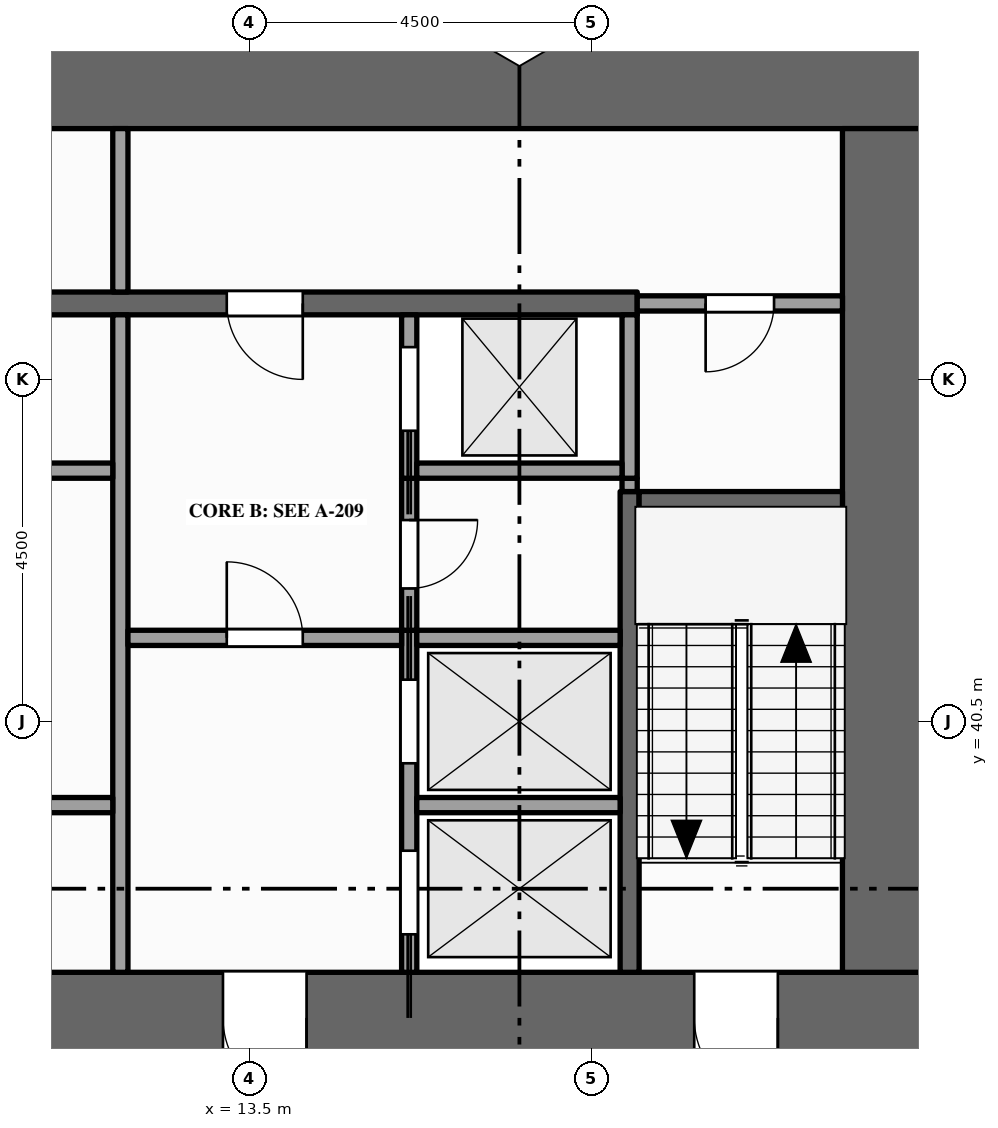
"""IFC4 building model, lengths in metres.
Left out: names, types, materials, properties, quantities, classifications, styles, units other than length and angle.
Written with IfcOpenShell. Run it as: python <this file> out.ifc"""

import sys

from ifc_helpers import new_model, si_unit, direction, frame, frame_2d, origin, place, context, subcontext, project, spatial, rectangle, extrude, element, fill, save


model = new_model("IFC4")
c1 = context("Model", 3, precision=1e-05, world=origin(), true_north=direction((0.0, 1.0)))
c2 = subcontext(c1, "Body", "Model", "MODEL_VIEW")
j1 = project(units=[si_unit("LENGTHUNIT", "METRE"), si_unit("PLANEANGLEUNIT", "RADIAN")], contexts=[c1])
p1 = place(None, origin())
s1 = spatial("IfcSite", under=j1, at=p1, CompositionType="ELEMENT")
p2 = place(p1, origin())
s2 = spatial("IfcBuilding", under=s1, at=p2, CompositionType="ELEMENT")
p3 = place(p2, frame((0.0, 0.0, 45.0)))
s3 = spatial("IfcBuildingStorey", under=s2, at=p3, CompositionType="ELEMENT", Elevation=45.0)
p4 = place(p3, frame((0.0, 36.6, -0.15), z_axis=(0.0, 0.0, 1.0), x_axis=(1.0, 0.0, 0.0)))
e1 = element("IfcWall", 1, at=p4, inside=s3, PredefinedType="SHEAR", context=c2, shape_type="SweptSolid", body=[
    extrude(rectangle(XDim=22.5, YDim=1.2, at=frame_2d((11.25, 0.0))), origin(), (0.0, 0.0, 1.0), 4.0),
])
p5 = place(p4, frame((7.1, 0.0, 0.15)))
e2 = element("IfcOpeningElement", 2, at=p5, cuts=e1, PredefinedType="OPENING", context=c2, shape_type="SweptSolid", body=[
    extrude(rectangle(XDim=1.8, YDim=2.1, at=frame_2d((0.9, 1.05))), frame((0.0, 0.61, 0.0), z_axis=(0.0, -1.0, 0.0), x_axis=(1.0, 0.0, 0.0)), (0.0, 0.0, 1.0), 1.22),
])
p6 = place(p4, frame((13.15, 0.0, 0.15)))
e3 = element("IfcOpeningElement", 3, at=p6, cuts=e1, PredefinedType="OPENING", context=c2, shape_type="SweptSolid", body=[
    extrude(rectangle(XDim=1.1, YDim=2.1, at=frame_2d((0.55, 1.05))), frame((0.0, 0.61, 0.0), z_axis=(0.0, -1.0, 0.0), x_axis=(1.0, 0.0, 0.0)), (0.0, 0.0, 1.0), 1.22),
])
p7 = place(p4, frame((2.15, 0.0, 0.15)))
e4 = element("IfcOpeningElement", 4, at=p7, cuts=e1, PredefinedType="OPENING", context=c2, shape_type="SweptSolid", body=[
    extrude(rectangle(XDim=1.1, YDim=2.1, at=frame_2d((0.55, 1.05))), frame((0.0, 0.61, 0.0), z_axis=(0.0, -1.0, 0.0), x_axis=(1.0, 0.0, 0.0)), (0.0, 0.0, 1.0), 1.22),
])
p8 = place(p4, frame((19.35, 0.0, 0.15)))
e5 = element("IfcOpeningElement", 5, at=p8, cuts=e1, PredefinedType="OPENING", context=c2, shape_type="SweptSolid", body=[
    extrude(rectangle(XDim=1.1, YDim=2.1, at=frame_2d((0.55, 1.05))), frame((0.0, 0.61, 0.0), z_axis=(0.0, -1.0, 0.0), x_axis=(1.0, 0.0, 0.0)), (0.0, 0.0, 1.0), 1.22),
])
p9 = place(p3, frame((0.0, 48.9, -0.15), z_axis=(0.0, 0.0, 1.0), x_axis=(1.0, 0.0, 0.0)))
e6 = element("IfcWall", 6, at=p9, inside=s3, PredefinedType="SHEAR", context=c2, shape_type="SweptSolid", body=[
    extrude(rectangle(XDim=22.5, YDim=1.2, at=frame_2d((11.25, 0.0))), origin(), (0.0, 0.0, 1.0), 4.0),
])
p10 = place(p3, frame((21.9, 37.2, -0.15), z_axis=(0.0, 0.0, 1.0), x_axis=(0.0, 1.0, 0.0)))
e7 = element("IfcWall", 7, at=p10, inside=s3, PredefinedType="SHEAR", context=c2, shape_type="SweptSolid", body=[
    extrude(rectangle(XDim=11.1, YDim=1.2, at=frame_2d((5.55, 0.0))), origin(), (0.0, 0.0, 1.0), 4.0),
])
p11 = place(p3, frame((11.8, 37.2, 0.0), z_axis=(0.0, 0.0, 1.0), x_axis=(0.0, 1.0, 0.0)))
e8 = element("IfcWall", 8, at=p11, inside=s3, PredefinedType="PARTITIONING", context=c2, shape_type="SweptSolid", body=[
    extrude(rectangle(XDim=8.65, YDim=0.2, at=frame_2d((4.325, 0.0))), origin(), (0.0, 0.0, 1.0), 3.85),
])
p12 = place(p3, frame((11.8, 46.15, 0.0), z_axis=(0.0, 0.0, 1.0), x_axis=(0.0, 1.0, 0.0)))
e9 = element("IfcWall", 9, at=p12, inside=s3, PredefinedType="PARTITIONING", context=c2, shape_type="SweptSolid", body=[
    extrude(rectangle(XDim=2.15, YDim=0.2, at=frame_2d((1.075, 0.0))), origin(), (0.0, 0.0, 1.0), 3.85),
])
p13 = place(p3, frame((15.6, 37.2, 0.0), z_axis=(0.0, 0.0, 1.0), x_axis=(0.0, 1.0, 0.0)))
e10 = element("IfcWall", 10, at=p13, inside=s3, PredefinedType="SOLIDWALL", context=c2, shape_type="SweptSolid", body=[
    extrude(rectangle(XDim=4.5, YDim=0.2, at=frame_2d((2.25, 0.0))), origin(), (0.0, 0.0, 1.0), 3.85),
])
p14 = place(p13, frame((0.5, 0.0, 0.012)))
e11 = element("IfcOpeningElement", 11, at=p14, cuts=e10, PredefinedType="OPENING", context=c2, shape_type="SweptSolid", body=[
    extrude(rectangle(XDim=1.1, YDim=2.1, at=frame_2d((0.55, 1.05))), frame((0.0, 0.11, 0.0), z_axis=(0.0, -1.0, 0.0), x_axis=(1.0, 0.0, 0.0)), (0.0, 0.0, 1.0), 0.22),
])
p15 = place(p13, frame((2.75, 0.0, 0.012)))
e12 = element("IfcOpeningElement", 12, at=p15, cuts=e10, PredefinedType="OPENING", context=c2, shape_type="SweptSolid", body=[
    extrude(rectangle(XDim=1.1, YDim=2.1, at=frame_2d((0.55, 1.05))), frame((0.0, 0.11, 0.0), z_axis=(0.0, -1.0, 0.0), x_axis=(1.0, 0.0, 0.0)), (0.0, 0.0, 1.0), 0.22),
])
p16 = place(p3, frame((15.6, 41.7, 0.0), z_axis=(0.0, 0.0, 1.0), x_axis=(0.0, 1.0, 0.0)))
e13 = element("IfcWall", 13, at=p16, inside=s3, PredefinedType="PARTITIONING", context=c2, shape_type="SweptSolid", body=[
    extrude(rectangle(XDim=2.0, YDim=0.2, at=frame_2d((1.0, 0.0))), origin(), (0.0, 0.0, 1.0), 3.85),
])
p17 = place(p16, frame((0.55, 0.0, 0.0)))
e14 = element("IfcOpeningElement", 14, at=p17, cuts=e13, PredefinedType="OPENING", context=c2, shape_type="SweptSolid", body=[
    extrude(rectangle(XDim=0.9, YDim=2.1, at=frame_2d((0.45, 1.05))), frame((0.0, 0.11, 0.0), z_axis=(0.0, -1.0, 0.0), x_axis=(1.0, 0.0, 0.0)), (0.0, 0.0, 1.0), 0.22),
])
p18 = place(p3, frame((15.6, 43.7, 0.0), z_axis=(0.0, 0.0, 1.0), x_axis=(0.0, 1.0, 0.0)))
e15 = element("IfcWall", 15, at=p18, inside=s3, PredefinedType="SOLIDWALL", context=c2, shape_type="SweptSolid", body=[
    extrude(rectangle(XDim=2.15, YDim=0.2, at=frame_2d((1.075, 0.0))), origin(), (0.0, 0.0, 1.0), 3.85),
])
p19 = place(p18, frame((0.625, 0.0, 0.012)))
e16 = element("IfcOpeningElement", 16, at=p19, cuts=e15, PredefinedType="OPENING", context=c2, shape_type="SweptSolid", body=[
    extrude(rectangle(XDim=1.1, YDim=2.1, at=frame_2d((0.55, 1.05))), frame((0.0, 0.11, 0.0), z_axis=(0.0, -1.0, 0.0), x_axis=(1.0, 0.0, 0.0)), (0.0, 0.0, 1.0), 0.22),
])
p20 = place(p3, frame((18.5, 37.2, 0.0), z_axis=(0.0, 0.0, 1.0), x_axis=(0.0, 1.0, 0.0)))
e17 = element("IfcWall", 17, at=p20, inside=s3, PredefinedType="SHEAR", context=c2, shape_type="SweptSolid", body=[
    extrude(rectangle(XDim=6.325, YDim=0.25, at=frame_2d((3.163, 0.0))), origin(), (0.0, 0.0, 1.0), 3.85),
])
p21 = place(p3, frame((18.5, 43.525, 0.0), z_axis=(0.0, 0.0, 1.0), x_axis=(0.0, 1.0, 0.0)))
e18 = element("IfcWall", 18, at=p21, inside=s3, PredefinedType="PARTITIONING", context=c2, shape_type="SweptSolid", body=[
    extrude(rectangle(XDim=0.175, YDim=0.2, at=frame_2d((0.087, 0.0))), origin(), (0.0, 0.0, 1.0), 3.85),
])
p22 = place(p3, frame((18.5, 43.7, 0.0), z_axis=(0.0, 0.0, 1.0), x_axis=(0.0, 1.0, 0.0)))
e19 = element("IfcWall", 19, at=p22, inside=s3, PredefinedType="SOLIDWALL", context=c2, shape_type="SweptSolid", body=[
    extrude(rectangle(XDim=2.15, YDim=0.2, at=frame_2d((1.075, 0.0))), origin(), (0.0, 0.0, 1.0), 3.85),
])
p23 = place(p3, frame((9.5, 39.4, 0.0), z_axis=(0.0, 0.0, 1.0), x_axis=(1.0, 0.0, 0.0)))
e20 = element("IfcWall", 20, at=p23, inside=s3, PredefinedType="PARTITIONING", context=c2, shape_type="SweptSolid", body=[
    extrude(rectangle(XDim=2.2, YDim=0.2, at=frame_2d((1.1, 0.0))), origin(), (0.0, 0.0, 1.0), 3.85),
])
p24 = place(p3, frame((15.7, 39.4, 0.0), z_axis=(0.0, 0.0, 1.0), x_axis=(1.0, 0.0, 0.0)))
e21 = element("IfcWall", 21, at=p24, inside=s3, PredefinedType="SOLIDWALL", context=c2, shape_type="SweptSolid", body=[
    extrude(rectangle(XDim=2.675, YDim=0.2, at=frame_2d((1.337, 0.0))), origin(), (0.0, 0.0, 1.0), 3.85),
])
p25 = place(p3, frame((11.9, 41.6, 0.0), z_axis=(0.0, 0.0, 1.0), x_axis=(1.0, 0.0, 0.0)))
e22 = element("IfcWall", 22, at=p25, inside=s3, PredefinedType="PARTITIONING", context=c2, shape_type="SweptSolid", body=[
    extrude(rectangle(XDim=3.6, YDim=0.2, at=frame_2d((1.8, 0.0))), origin(), (0.0, 0.0, 1.0), 3.85),
])
p26 = place(p25, frame((1.3, 0.0, 0.0)))
e23 = element("IfcOpeningElement", 23, at=p26, cuts=e22, PredefinedType="OPENING", context=c2, shape_type="SweptSolid", body=[
    extrude(rectangle(XDim=1.0, YDim=2.1, at=frame_2d((0.5, 1.05))), frame((0.0, 0.11, 0.0), z_axis=(0.0, -1.0, 0.0), x_axis=(1.0, 0.0, 0.0)), (0.0, 0.0, 1.0), 0.22),
])
p27 = place(p3, frame((15.7, 41.6, 0.0), z_axis=(0.0, 0.0, 1.0), x_axis=(1.0, 0.0, 0.0)))
e24 = element("IfcWall", 24, at=p27, inside=s3, PredefinedType="SOLIDWALL", context=c2, shape_type="SweptSolid", body=[
    extrude(rectangle(XDim=2.675, YDim=0.2, at=frame_2d((1.337, 0.0))), origin(), (0.0, 0.0, 1.0), 3.85),
])
p28 = place(p3, frame((18.625, 43.4, 0.0), z_axis=(0.0, 0.0, 1.0), x_axis=(1.0, 0.0, 0.0)))
e25 = element("IfcWall", 25, at=p28, inside=s3, PredefinedType="SHEAR", context=c2, shape_type="SweptSolid", body=[
    extrude(rectangle(XDim=2.675, YDim=0.25, at=frame_2d((1.337, 0.0))), origin(), (0.0, 0.0, 1.0), 3.85),
])
p29 = place(p3, frame((9.5, 43.8, 0.0), z_axis=(0.0, 0.0, 1.0), x_axis=(1.0, 0.0, 0.0)))
e26 = element("IfcWall", 26, at=p29, inside=s3, PredefinedType="PARTITIONING", context=c2, shape_type="SweptSolid", body=[
    extrude(rectangle(XDim=2.2, YDim=0.2, at=frame_2d((1.1, 0.0))), origin(), (0.0, 0.0, 1.0), 3.85),
])
p30 = place(p3, frame((15.7, 43.8, 0.0), z_axis=(0.0, 0.0, 1.0), x_axis=(1.0, 0.0, 0.0)))
e27 = element("IfcWall", 27, at=p30, inside=s3, PredefinedType="SOLIDWALL", context=c2, shape_type="SweptSolid", body=[
    extrude(rectangle(XDim=2.7, YDim=0.2, at=frame_2d((1.35, 0.0))), origin(), (0.0, 0.0, 1.0), 3.85),
])
p31 = place(p3, frame((4.1, 46.0, 0.0), z_axis=(0.0, 0.0, 1.0), x_axis=(1.0, 0.0, 0.0)))
e28 = element("IfcWall", 28, at=p31, inside=s3, PredefinedType="SHEAR", context=c2, shape_type="SweptSolid", body=[
    extrude(rectangle(XDim=14.5, YDim=0.3, at=frame_2d((7.25, 0.0))), origin(), (0.0, 0.0, 1.0), 3.85),
])
p32 = place(p31, frame((3.4, 0.0, 0.0)))
e29 = element("IfcOpeningElement", 29, at=p32, cuts=e28, PredefinedType="OPENING", context=c2, shape_type="SweptSolid", body=[
    extrude(rectangle(XDim=1.0, YDim=2.1, at=frame_2d((0.5, 1.05))), frame((0.0, 0.16, 0.0), z_axis=(0.0, -1.0, 0.0), x_axis=(1.0, 0.0, 0.0)), (0.0, 0.0, 1.0), 0.32),
])
p33 = place(p31, frame((9.1, 0.0, 0.0)))
e30 = element("IfcOpeningElement", 30, at=p33, cuts=e28, PredefinedType="OPENING", context=c2, shape_type="SweptSolid", body=[
    extrude(rectangle(XDim=1.0, YDim=2.1, at=frame_2d((0.5, 1.05))), frame((0.0, 0.16, 0.0), z_axis=(0.0, -1.0, 0.0), x_axis=(1.0, 0.0, 0.0)), (0.0, 0.0, 1.0), 0.32),
])
p34 = place(p3, frame((18.6, 46.0, 0.0), z_axis=(0.0, 0.0, 1.0), x_axis=(1.0, 0.0, 0.0)))
e31 = element("IfcWall", 31, at=p34, inside=s3, PredefinedType="PARTITIONING", context=c2, shape_type="SweptSolid", body=[
    extrude(rectangle(XDim=2.7, YDim=0.2, at=frame_2d((1.35, 0.0))), origin(), (0.0, 0.0, 1.0), 3.85),
])
p35 = place(p34, frame((0.9, 0.0, 0.0)))
e32 = element("IfcOpeningElement", 32, at=p35, cuts=e31, PredefinedType="OPENING", context=c2, shape_type="SweptSolid", body=[
    extrude(rectangle(XDim=0.9, YDim=2.1, at=frame_2d((0.45, 1.05))), frame((0.0, 0.11, 0.0), z_axis=(0.0, -1.0, 0.0), x_axis=(1.0, 0.0, 0.0)), (0.0, 0.0, 1.0), 0.22),
])
p36 = place(p14, origin())
e33 = element("IfcDoor", 33, at=p36, inside=s3, OperationType="SLIDING_TO_LEFT", PredefinedType="DOOR", context=c2, shape_type="SweptSolid", body=[
    extrude(rectangle(XDim=1.1, YDim=2.1, at=frame_2d((0.55, 1.05))), frame((0.0, 0.025, 0.0), z_axis=(0.0, -1.0, 0.0), x_axis=(1.0, 0.0, 0.0)), (0.0, 0.0, 1.0), 0.05),
])
fill(e11, e33)
p37 = place(p15, origin())
e34 = element("IfcDoor", 34, at=p37, inside=s3, OperationType="SLIDING_TO_RIGHT", PredefinedType="DOOR", context=c2, shape_type="SweptSolid", body=[
    extrude(rectangle(XDim=1.1, YDim=2.1, at=frame_2d((0.55, 1.05))), frame((0.0, 0.025, 0.0), z_axis=(0.0, -1.0, 0.0), x_axis=(1.0, 0.0, 0.0)), (0.0, 0.0, 1.0), 0.05),
])
fill(e12, e34)
p38 = place(p19, origin())
e35 = element("IfcDoor", 35, at=p38, inside=s3, OperationType="SLIDING_TO_LEFT", PredefinedType="DOOR", context=c2, shape_type="SweptSolid", body=[
    extrude(rectangle(XDim=1.1, YDim=2.1, at=frame_2d((0.55, 1.05))), frame((0.0, 0.025, 0.0), z_axis=(0.0, -1.0, 0.0), x_axis=(1.0, 0.0, 0.0)), (0.0, 0.0, 1.0), 0.05),
])
fill(e16, e35)
p39 = place(p6, origin())
e36 = element("IfcDoor", 36, at=p39, inside=s3, OperationType="SINGLE_SWING_RIGHT", PredefinedType="DOOR", context=c2, shape_type="SweptSolid", body=[
    extrude(rectangle(XDim=1.1, YDim=2.1, at=frame_2d((0.55, 1.05))), frame((0.0, 0.025, 0.0), z_axis=(0.0, -1.0, 0.0), x_axis=(1.0, 0.0, 0.0)), (0.0, 0.0, 1.0), 0.05),
])
fill(e3, e36)
p40 = place(p26, origin())
e37 = element("IfcDoor", 37, at=p40, inside=s3, OperationType="SINGLE_SWING_LEFT", PredefinedType="DOOR", context=c2, shape_type="SweptSolid", body=[
    extrude(rectangle(XDim=1.0, YDim=2.1, at=frame_2d((0.5, 1.05))), frame((0.0, 0.025, 0.0), z_axis=(0.0, -1.0, 0.0), x_axis=(1.0, 0.0, 0.0)), (0.0, 0.0, 1.0), 0.05),
])
fill(e23, e37)
p41 = place(p33, origin())
e38 = element("IfcDoor", 38, at=p41, inside=s3, OperationType="SINGLE_SWING_RIGHT", PredefinedType="DOOR", context=c2, shape_type="SweptSolid", body=[
    extrude(rectangle(XDim=1.0, YDim=2.1, at=frame_2d((0.5, 1.05))), frame((0.0, 0.025, 0.0), z_axis=(0.0, -1.0, 0.0), x_axis=(1.0, 0.0, 0.0)), (0.0, 0.0, 1.0), 0.05),
])
fill(e30, e38)
p42 = place(p8, origin())
e39 = element("IfcDoor", 39, at=p42, inside=s3, OperationType="SINGLE_SWING_RIGHT", PredefinedType="DOOR", context=c2, shape_type="SweptSolid", body=[
    extrude(rectangle(XDim=1.1, YDim=2.1, at=frame_2d((0.55, 1.05))), frame((0.0, 0.025, 0.0), z_axis=(0.0, -1.0, 0.0), x_axis=(1.0, 0.0, 0.0)), (0.0, 0.0, 1.0), 0.05),
])
fill(e5, e39)
p43 = place(p35, origin())
e40 = element("IfcDoor", 40, at=p43, inside=s3, OperationType="SINGLE_SWING_LEFT", PredefinedType="DOOR", context=c2, shape_type="SweptSolid", body=[
    extrude(rectangle(XDim=0.9, YDim=2.1, at=frame_2d((0.45, 1.05))), frame((0.0, 0.025, 0.0), z_axis=(0.0, -1.0, 0.0), x_axis=(1.0, 0.0, 0.0)), (0.0, 0.0, 1.0), 0.05),
])
fill(e32, e40)
p44 = place(p17, origin())
e41 = element("IfcDoor", 41, at=p44, inside=s3, OperationType="SINGLE_SWING_RIGHT", PredefinedType="DOOR", context=c2, shape_type="SweptSolid", body=[
    extrude(rectangle(XDim=0.9, YDim=2.1, at=frame_2d((0.45, 1.05))), frame((0.0, 0.025, 0.0), z_axis=(0.0, -1.0, 0.0), x_axis=(1.0, 0.0, 0.0)), (0.0, 0.0, 1.0), 0.05),
])
fill(e14, e41)
save(model, sys.argv[1])
